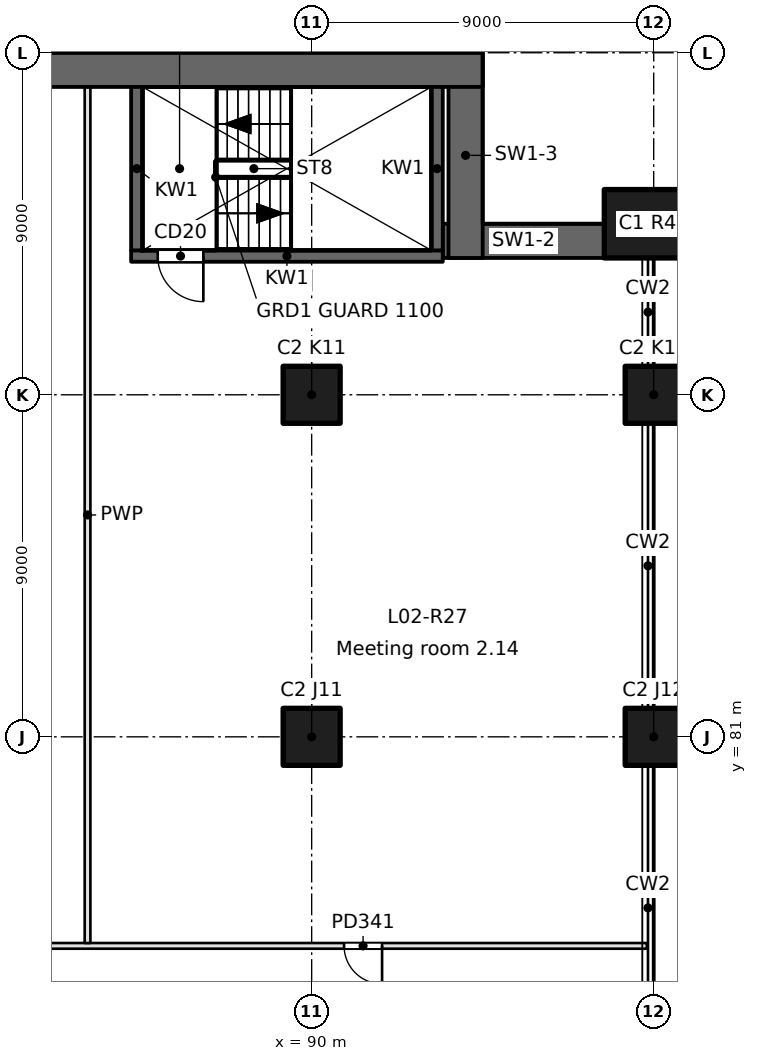
"""IFC4 building model, lengths in metres.
Left out: names, types, materials, properties, quantities, classifications, styles, units other than length and angle.
Written with IfcOpenShell. Run it as: python <this file> out.ifc"""

import sys

from ifc_helpers import new_model, si_unit, direction, frame, frame_2d, origin, origin_2d, place, context, subcontext, project, spatial, rectangle, extrude, element, fill, save


model = new_model("IFC4")
c1 = context("Model", 3, precision=1e-05, world=origin(), true_north=direction((0.0, 1.0)))
c2 = subcontext(c1, "Body", "Model", "MODEL_VIEW")
j1 = project(units=[si_unit("LENGTHUNIT", "METRE"), si_unit("PLANEANGLEUNIT", "RADIAN")], contexts=[c1])
p1 = place(None, origin())
s1 = spatial("IfcSite", under=j1, at=p1, CompositionType="ELEMENT")
p2 = place(p1, origin())
s2 = spatial("IfcBuilding", under=s1, at=p2, CompositionType="ELEMENT")
p3 = place(p2, frame((0.0, 0.0, 11.4)))
s3 = spatial("IfcBuildingStorey", under=s2, at=p3, CompositionType="ELEMENT", Elevation=11.4)
for number, where, z_axis, x_axis in (
    (1, (99.0, 81.0, 0.0), (0.0, 0.0, 1.0), (1.0, 0.0, 0.0)),
    (2, (99.0, 90.0, 0.0), (0.0, 0.0, 1.0), (1.0, 0.0, 0.0)),
):
    element("IfcColumn", number, at=place(p3, frame(where, z_axis=z_axis, x_axis=x_axis)), inside=s3, PredefinedType="COLUMN", context=c2, shape_type="SweptSolid", body=[
        extrude(rectangle(XDim=1.5, YDim=1.5, at=origin_2d()), origin(), (0.0, 0.0, 1.0), 5.4),
    ])
p4 = place(p3, frame((99.0, 94.5, 0.0), z_axis=(0.0, 0.0, 1.0), x_axis=(1.0, 0.0, 0.0)))
e3 = element("IfcColumn", 3, at=p4, inside=s3, PredefinedType="COLUMN", context=c2, shape_type="SweptSolid", body=[
    extrude(rectangle(XDim=2.6, YDim=1.8, at=origin_2d()), origin(), (0.0, 0.0, 1.0), 5.4),
])
for number, where, z_axis, x_axis in (
    (4, (90.0, 81.0, 0.0), (0.0, 0.0, 1.0), (1.0, 0.0, 0.0)),
    (5, (90.0, 90.0, 0.0), (0.0, 0.0, 1.0), (1.0, 0.0, 0.0)),
):
    element("IfcColumn", number, at=place(p3, frame(where, z_axis=z_axis, x_axis=x_axis)), inside=s3, PredefinedType="COLUMN", context=c2, shape_type="SweptSolid", body=[
        extrude(rectangle(XDim=1.5, YDim=1.5, at=origin_2d()), origin(), (0.0, 0.0, 1.0), 5.4),
    ])
p5 = place(p3, frame((97.7, 94.05, 0.0), z_axis=(0.0, 0.0, 1.0), x_axis=(-1.0, 0.0, 0.0)))
e6 = element("IfcWall", 6, at=p5, inside=s3, PredefinedType="SHEAR", context=c2, shape_type="SweptSolid", body=[
    extrude(rectangle(XDim=4.25, YDim=0.9, at=frame_2d((2.125, 0.0))), origin(), (0.0, 0.0, 1.0), 5.4),
])
p6 = place(p3, frame((94.05, 93.6, 0.0), z_axis=(0.0, 0.0, 1.0), x_axis=(0.0, 1.0, 0.0)))
e7 = element("IfcWall", 7, at=p6, inside=s3, PredefinedType="SHEAR", context=c2, shape_type="SweptSolid", body=[
    extrude(rectangle(XDim=5.4, YDim=0.9, at=frame_2d((2.7, 0.0))), origin(), (0.0, 0.0, 1.0), 5.4),
])
p7 = place(p3, frame((94.5, 98.55, 0.0), z_axis=(0.0, 0.0, 1.0), x_axis=(-1.0, 0.0, 0.0)))
e8 = element("IfcWall", 8, at=p7, inside=s3, PredefinedType="SHEAR", context=c2, shape_type="SweptSolid", body=[
    extrude(rectangle(XDim=90.0, YDim=0.9, at=frame_2d((45.0, 0.0))), origin(), (0.0, 0.0, 1.0), 5.4),
])
p8 = place(p3, frame((85.25, 93.65, -0.35), z_axis=(0.0, 0.0, 1.0), x_axis=(1.0, 0.0, 0.0)))
e9 = element("IfcWall", 9, at=p8, inside=s3, PredefinedType="SOLIDWALL", context=c2, shape_type="SweptSolid", body=[
    extrude(rectangle(XDim=8.2, YDim=0.3, at=frame_2d((4.1, 0.0))), origin(), (0.0, 0.0, 1.0), 5.4),
])
p9 = place(p8, frame((0.7, 0.0, 0.35)))
e10 = element("IfcOpeningElement", 10, at=p9, cuts=e9, PredefinedType="OPENING", context=c2, shape_type="SweptSolid", body=[
    extrude(rectangle(XDim=1.2, YDim=2.1, at=frame_2d((0.6, 1.05))), frame((0.0, 0.15, 0.0), z_axis=(0.0, -1.0, 0.0), x_axis=(1.0, 0.0, 0.0)), (0.0, 0.0, 1.0), 0.3),
])
for number, where, z_axis, x_axis in (
    (11, (85.4, 93.8, -0.35), (0.0, 0.0, 1.0), (0.0, 1.0, 0.0)),
    (12, (93.3, 93.8, -0.35), (0.0, 0.0, 1.0), (0.0, 1.0, 0.0)),
):
    element("IfcWall", number, at=place(p3, frame(where, z_axis=z_axis, x_axis=x_axis)), inside=s3, PredefinedType="SOLIDWALL", context=c2, shape_type="SweptSolid", body=[
        extrude(rectangle(XDim=4.3, YDim=0.3, at=frame_2d((2.15, 0.0))), origin(), (0.0, 0.0, 1.0), 5.4),
    ])
p10 = place(p3, frame((98.82, 75.5, 0.0), z_axis=(0.0, 0.0, 1.0), x_axis=(-1.0, 0.0, 0.0)))
e13 = element("IfcWall", 13, at=p10, inside=s3, PredefinedType="PARTITIONING", context=c2, shape_type="SweptSolid", body=[
    extrude(rectangle(XDim=52.945, YDim=0.15, at=frame_2d((26.473, 0.0))), origin(), (0.0, 0.0, 1.0), 5.05),
])
p11 = place(p10, frame((46.695, 0.0, 0.0)))
e14 = element("IfcOpeningElement", 14, at=p11, cuts=e13, PredefinedType="OPENING", context=c2, shape_type="SweptSolid", body=[
    extrude(rectangle(XDim=1.0, YDim=2.1, at=frame_2d((0.5, 1.05))), frame((0.0, 0.075, 0.0), z_axis=(0.0, -1.0, 0.0), x_axis=(1.0, 0.0, 0.0)), (0.0, 0.0, 1.0), 0.15),
])
p12 = place(p10, frame((32.406, 0.0, 0.0)))
e15 = element("IfcOpeningElement", 15, at=p12, cuts=e13, PredefinedType="OPENING", context=c2, shape_type="SweptSolid", body=[
    extrude(rectangle(XDim=1.0, YDim=2.1, at=frame_2d((0.5, 1.05))), frame((0.0, 0.075, 0.0), z_axis=(0.0, -1.0, 0.0), x_axis=(1.0, 0.0, 0.0)), (0.0, 0.0, 1.0), 0.15),
])
p13 = place(p10, frame((19.148, 0.0, 0.0)))
e16 = element("IfcOpeningElement", 16, at=p13, cuts=e13, PredefinedType="OPENING", context=c2, shape_type="SweptSolid", body=[
    extrude(rectangle(XDim=1.0, YDim=2.1, at=frame_2d((0.5, 1.05))), frame((0.0, 0.075, 0.0), z_axis=(0.0, -1.0, 0.0), x_axis=(1.0, 0.0, 0.0)), (0.0, 0.0, 1.0), 0.15),
])
p14 = place(p10, frame((6.967, 0.0, 0.0)))
e17 = element("IfcOpeningElement", 17, at=p14, cuts=e13, PredefinedType="OPENING", context=c2, shape_type="SweptSolid", body=[
    extrude(rectangle(XDim=1.0, YDim=2.1, at=frame_2d((0.5, 1.05))), frame((0.0, 0.075, 0.0), z_axis=(0.0, -1.0, 0.0), x_axis=(1.0, 0.0, 0.0)), (0.0, 0.0, 1.0), 0.15),
])
p15 = place(p3, frame((84.103, 75.575, 0.0), z_axis=(0.0, 0.0, 1.0), x_axis=(0.0, 1.0, 0.0)))
e18 = element("IfcWall", 18, at=p15, inside=s3, PredefinedType="PARTITIONING", context=c2, shape_type="SweptSolid", body=[
    extrude(rectangle(XDim=22.525, YDim=0.15, at=frame_2d((11.263, 0.0))), origin(), (0.0, 0.0, 1.0), 5.05),
])
p16 = place(p9, frame((1.2, 0.0, 0.0), z_axis=(0.0, 0.0, 1.0), x_axis=(-1.0, 0.0, 0.0)))
e19 = element("IfcDoor", 19, at=p16, inside=s3, OperationType="SINGLE_SWING_LEFT", PredefinedType="DOOR", context=c2, shape_type="SweptSolid", body=[
    extrude(rectangle(XDim=1.2, YDim=2.1, at=frame_2d((0.6, 1.05))), frame((0.0, 0.025, 0.0), z_axis=(0.0, -1.0, 0.0), x_axis=(1.0, 0.0, 0.0)), (0.0, 0.0, 1.0), 0.05),
])
fill(e10, e19)
p17 = place(p14, origin())
e20 = element("IfcDoor", 20, at=p17, inside=s3, OperationType="SINGLE_SWING_LEFT", PredefinedType="DOOR", context=c2, shape_type="SweptSolid", body=[
    extrude(rectangle(XDim=1.0, YDim=2.1, at=frame_2d((0.5, 1.05))), frame((0.0, 0.025, 0.0), z_axis=(0.0, -1.0, 0.0), x_axis=(1.0, 0.0, 0.0)), (0.0, 0.0, 1.0), 0.05),
])
fill(e17, e20)
save(model, sys.argv[1])
